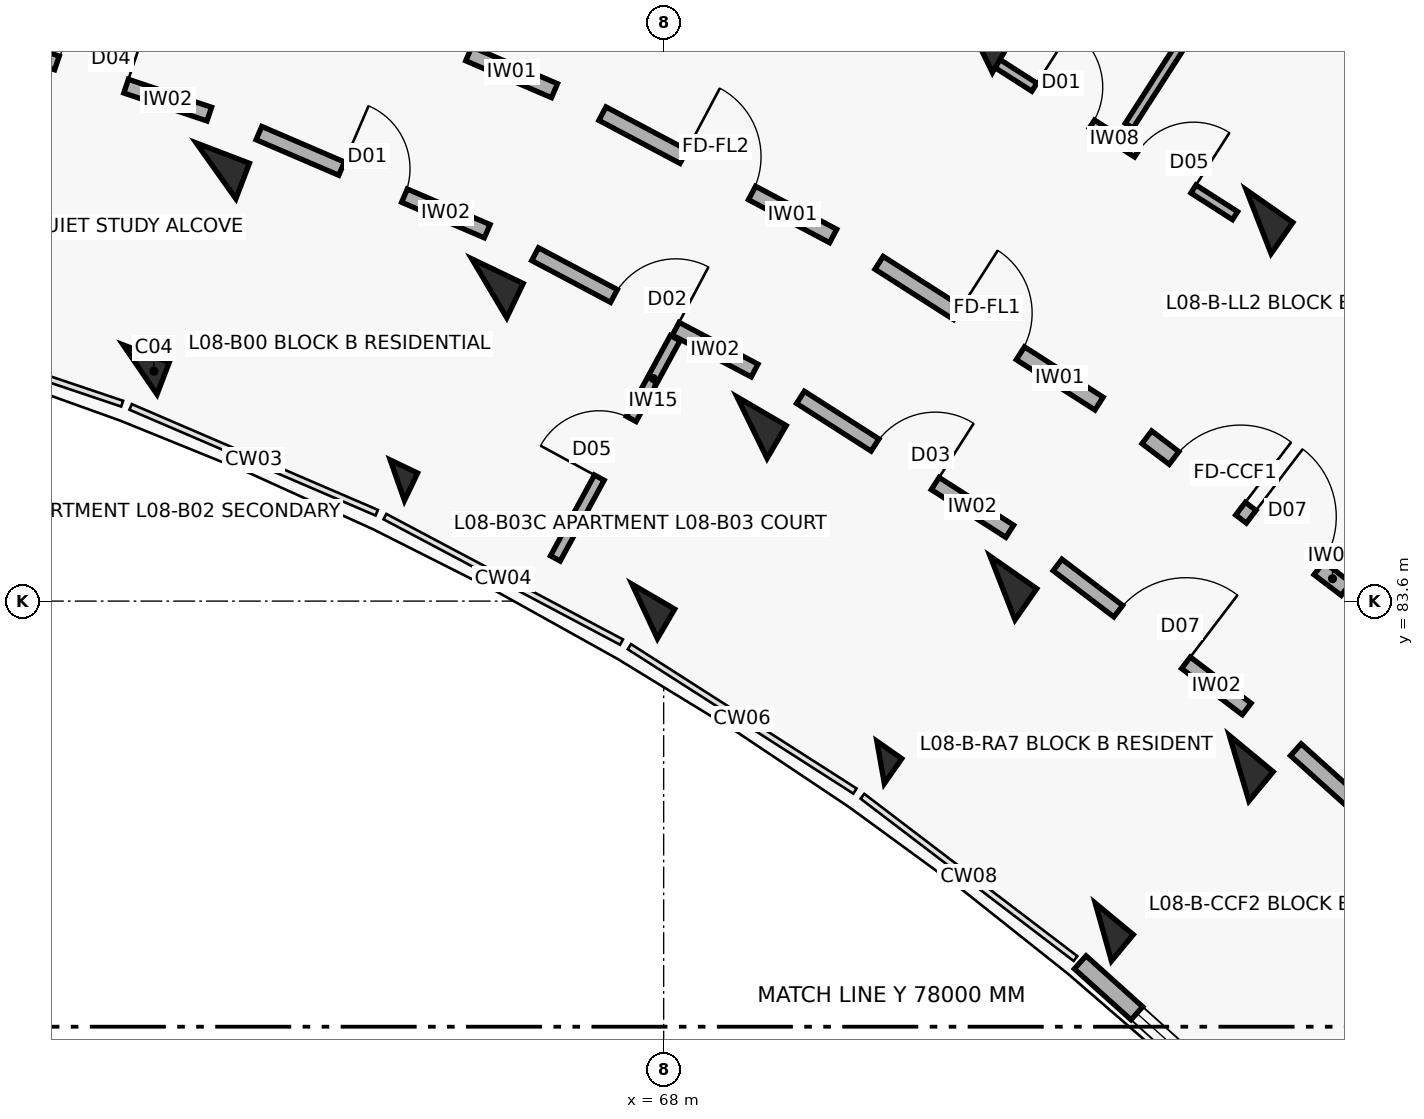
"""IFC4 building model, lengths in metres.
Left out: names, types, materials, properties, quantities, classifications, styles, units other than length and angle.
Written with IfcOpenShell. Run it as: python <this file> out.ifc"""

import sys

from ifc_helpers import new_model, si_unit, direction, frame, frame_2d, origin, origin_2d, place, context, subcontext, project, spatial, rectangle, extrude, element, fill, save


model = new_model("IFC4")
c1 = context("Model", 3, precision=1e-05, world=origin(), true_north=direction((0.0, 1.0)))
c2 = subcontext(c1, "Body", "Model", "MODEL_VIEW")
j1 = project(units=[si_unit("LENGTHUNIT", "METRE"), si_unit("PLANEANGLEUNIT", "RADIAN")], contexts=[c1])
p1 = place(None, origin())
s1 = spatial("IfcSite", under=j1, at=p1, CompositionType="ELEMENT")
p2 = place(p1, origin())
s2 = spatial("IfcBuilding", under=s1, at=p2, CompositionType="ELEMENT")
p3 = place(p2, frame((0.0, 0.0, 26.7)))
s3 = spatial("IfcBuildingStorey", under=s2, at=p3, CompositionType="ELEMENT", Elevation=26.7)
p4 = place(p3, frame((61.111, 86.646, 0.0), z_axis=(0.0, 0.0, 1.0), x_axis=(0.357064076459, 0.934079892355, 0.0)))
e1 = element("IfcColumn", 1, at=p4, inside=s3, PredefinedType="COLUMN", context=c2, shape_type="SweptSolid", body=[
    extrude(rectangle(XDim=0.45, YDim=0.65, at=origin_2d()), origin(), (0.0, 0.0, 1.0), 3.1),
])
p5 = place(p3, frame((62.111, 89.261, 0.0), z_axis=(0.0, 0.0, 1.0), x_axis=(0.357064076459, 0.934079892355, 0.0)))
e2 = element("IfcColumn", 2, at=p5, inside=s3, PredefinedType="COLUMN", context=c2, shape_type="SweptSolid", body=[
    extrude(rectangle(XDim=0.5, YDim=0.75, at=origin_2d()), origin(), (0.0, 0.0, 1.0), 3.1),
])
p6 = place(p3, frame((64.496, 85.191, 0.0), z_axis=(0.0, 0.0, 1.0), x_axis=(0.432085748802, 0.901832526405, 0.0)))
e3 = element("IfcColumn", 3, at=p6, inside=s3, PredefinedType="COLUMN", context=c2, shape_type="SweptSolid", body=[
    extrude(rectangle(XDim=0.4, YDim=0.4, at=origin_2d()), origin(), (0.0, 0.0, 1.0), 3.1),
])
p7 = place(p3, frame((65.706, 87.716, 0.0), z_axis=(0.0, 0.0, 1.0), x_axis=(0.432085748802, 0.901832526405, 0.0)))
e4 = element("IfcColumn", 4, at=p7, inside=s3, PredefinedType="COLUMN", context=c2, shape_type="SweptSolid", body=[
    extrude(rectangle(XDim=0.5, YDim=0.75, at=origin_2d()), origin(), (0.0, 0.0, 1.0), 3.1),
])
p8 = place(p3, frame((67.751, 83.464, 0.0), z_axis=(0.0, 0.0, 1.0), x_axis=(0.504226211181, 0.863571611366, 0.0)))
e5 = element("IfcColumn", 5, at=p8, inside=s3, PredefinedType="COLUMN", context=c2, shape_type="SweptSolid", body=[
    extrude(rectangle(XDim=0.45, YDim=0.65, at=origin_2d()), origin(), (0.0, 0.0, 1.0), 3.1),
])
for number, where, z_axis, x_axis in (
    (6, (69.163, 85.882, 0.0), (0.0, 0.0, 1.0), (0.504, 0.864, 0.0)),
    (7, (72.127, 90.96, 0.0), (0.0, 0.0, 1.0), (0.504, 0.864, 0.0)),
):
    element("IfcColumn", number, at=place(p3, frame(where, z_axis=z_axis, x_axis=x_axis)), inside=s3, PredefinedType="COLUMN", context=c2, shape_type="SweptSolid", body=[
        extrude(rectangle(XDim=0.5, YDim=0.75, at=origin_2d()), origin(), (0.0, 0.0, 1.0), 3.1),
    ])
p9 = place(p3, frame((70.854, 81.478, 0.0), z_axis=(0.0, 0.0, 1.0), x_axis=(0.573004420611, 0.819552276527, 0.0)))
e8 = element("IfcColumn", 8, at=p9, inside=s3, PredefinedType="COLUMN", context=c2, shape_type="SweptSolid", body=[
    extrude(rectangle(XDim=0.4, YDim=0.4, at=origin_2d()), origin(), (0.0, 0.0, 1.0), 3.1),
])
for number, where, z_axis, x_axis in (
    (9, (72.458, 83.773, 0.0), (0.0, 0.0, 1.0), (0.573, 0.82, 0.0)),
    (10, (75.828, 88.592, 0.0), (0.0, 0.0, 1.0), (0.573, 0.82, 0.0)),
):
    element("IfcColumn", number, at=place(p3, frame(where, z_axis=z_axis, x_axis=x_axis)), inside=s3, PredefinedType="COLUMN", context=c2, shape_type="SweptSolid", body=[
        extrude(rectangle(XDim=0.5, YDim=0.75, at=origin_2d()), origin(), (0.0, 0.0, 1.0), 3.1),
    ])
p10 = place(p3, frame((73.785, 79.245, 0.0), z_axis=(0.0, 0.0, 1.0), x_axis=(0.637961754089, 0.770068049148, 0.0)))
e11 = element("IfcColumn", 11, at=p10, inside=s3, PredefinedType="COLUMN", context=c2, shape_type="SweptSolid", body=[
    extrude(rectangle(XDim=0.45, YDim=0.65, at=origin_2d()), origin(), (0.0, 0.0, 1.0), 3.1),
])
p11 = place(p3, frame((75.571, 81.402, 0.0), z_axis=(0.0, 0.0, 1.0), x_axis=(0.637961754089, 0.770068049148, 0.0)))
e12 = element("IfcColumn", 12, at=p11, inside=s3, PredefinedType="COLUMN", context=c2, shape_type="SweptSolid", body=[
    extrude(rectangle(XDim=0.5, YDim=0.75, at=origin_2d()), origin(), (0.0, 0.0, 1.0), 3.1),
])
p12 = place(p3, frame((73.481, 78.847, 0.0), z_axis=(0.0, 0.0, 1.0), x_axis=(0.743385092197, -0.668863666751, 0.0)))
e13 = element("IfcWall", 13, at=p12, inside=s3, PredefinedType="SOLIDWALL", context=c2, shape_type="SweptSolid", body=[
    extrude(rectangle(XDim=3.604, YDim=0.23, at=frame_2d((1.802, 0.0))), origin(), (0.0, 0.0, 1.0), 2.25),
])
p13 = place(p12, frame((1.002, 0.0, 0.32)))
e14 = element("IfcOpeningElement", 14, at=p13, cuts=e13, PredefinedType="OPENING", context=c2, shape_type="SweptSolid", body=[
    extrude(rectangle(XDim=1.6, YDim=1.5, at=frame_2d((0.8, 0.75))), frame((0.0, 0.125, 0.0), z_axis=(0.0, -1.0, 0.0), x_axis=(1.0, 0.0, 0.0)), (0.0, 0.0, 1.0), 0.25),
])
p14 = place(p3, frame((58.923, 91.049, 0.0), z_axis=(0.0, 0.0, 1.0), x_axis=(0.94787351033, -0.318646839643, 0.0)))
e15 = element("IfcWall", 15, at=p14, inside=s3, PredefinedType="SOLIDWALL", context=c2, shape_type="SweptSolid", body=[
    extrude(rectangle(XDim=3.269, YDim=0.19, at=frame_2d((1.634, 0.0))), origin(), (0.0, 0.0, 1.0), 2.08),
])
p15 = place(p14, frame((1.154, 0.0, 0.0)))
e16 = element("IfcOpeningElement", 16, at=p15, cuts=e15, PredefinedType="OPENING", context=c2, shape_type="SweptSolid", body=[
    extrude(rectangle(XDim=0.96, YDim=2.1, at=frame_2d((0.48, 1.05))), frame((0.0, 0.105, 0.0), z_axis=(0.0, -1.0, 0.0), x_axis=(1.0, 0.0, 0.0)), (0.0, 0.0, 1.0), 0.21),
])
p16 = place(p3, frame((63.407, 91.673, 0.0), z_axis=(0.0, 0.0, 1.0), x_axis=(0.918718172399, -0.394913813008, 0.0)))
e17 = element("IfcWall", 17, at=p16, inside=s3, PredefinedType="SOLIDWALL", context=c2, shape_type="SweptSolid", body=[
    extrude(rectangle(XDim=3.436, YDim=0.2, at=frame_2d((1.718, 0.0))), origin(), (0.0, 0.0, 1.0), 2.08),
])
p17 = place(p16, frame((1.228, 0.0, 0.0)))
e18 = element("IfcOpeningElement", 18, at=p17, cuts=e17, PredefinedType="OPENING", context=c2, shape_type="SweptSolid", body=[
    extrude(rectangle(XDim=0.98, YDim=2.15, at=frame_2d((0.49, 1.075))), frame((0.0, 0.11, 0.0), z_axis=(0.0, -1.0, 0.0), x_axis=(1.0, 0.0, 0.0)), (0.0, 0.0, 1.0), 0.22),
])
p18 = place(p3, frame((62.675, 89.758, 0.0), z_axis=(0.0, 0.0, 1.0), x_axis=(0.918723391052, -0.394901672235, 0.0)))
e19 = element("IfcWall", 19, at=p18, inside=s3, PredefinedType="SOLIDWALL", context=c2, shape_type="SweptSolid", body=[
    extrude(rectangle(XDim=3.269, YDim=0.19, at=frame_2d((1.634, 0.0))), origin(), (0.0, 0.0, 1.0), 2.08),
])
p19 = place(p18, frame((1.184, 0.0, 0.0)))
e20 = element("IfcOpeningElement", 20, at=p19, cuts=e19, PredefinedType="OPENING", context=c2, shape_type="SweptSolid", body=[
    extrude(rectangle(XDim=0.9, YDim=2.1, at=frame_2d((0.45, 1.05))), frame((0.0, 0.105, 0.0), z_axis=(0.0, -1.0, 0.0), x_axis=(1.0, 0.0, 0.0)), (0.0, 0.0, 1.0), 0.21),
])
p20 = place(p3, frame((67.194, 90.014, 0.0), z_axis=(0.0, 0.0, 1.0), x_axis=(0.883410853063, -0.468599258099, 0.0)))
e21 = element("IfcWall", 21, at=p20, inside=s3, PredefinedType="SOLIDWALL", context=c2, shape_type="SweptSolid", body=[
    extrude(rectangle(XDim=3.436, YDim=0.2, at=frame_2d((1.718, 0.0))), origin(), (0.0, 0.0, 1.0), 2.08),
])
p21 = place(p20, frame((1.208, 0.0, 0.0)))
e22 = element("IfcOpeningElement", 22, at=p21, cuts=e21, PredefinedType="OPENING", context=c2, shape_type="SweptSolid", body=[
    extrude(rectangle(XDim=1.02, YDim=2.15, at=frame_2d((0.51, 1.075))), frame((0.0, 0.11, 0.0), z_axis=(0.0, -1.0, 0.0), x_axis=(1.0, 0.0, 0.0)), (0.0, 0.0, 1.0), 0.22),
])
p22 = place(p3, frame((66.309, 88.165, 0.0), z_axis=(0.0, 0.0, 1.0), x_axis=(0.883444301944, -0.468536194293, 0.0)))
e23 = element("IfcWall", 23, at=p22, inside=s3, PredefinedType="SOLIDWALL", context=c2, shape_type="SweptSolid", body=[
    extrude(rectangle(XDim=3.269, YDim=0.19, at=frame_2d((1.634, 0.0))), origin(), (0.0, 0.0, 1.0), 2.08),
])
p23 = place(p22, frame((1.174, 0.0, 0.0)))
e24 = element("IfcOpeningElement", 24, at=p23, cuts=e23, PredefinedType="OPENING", context=c2, shape_type="SweptSolid", body=[
    extrude(rectangle(XDim=0.92, YDim=2.1, at=frame_2d((0.46, 1.05))), frame((0.0, 0.105, 0.0), z_axis=(0.0, -1.0, 0.0), x_axis=(1.0, 0.0, 0.0)), (0.0, 0.0, 1.0), 0.21),
])
p24 = place(p3, frame((66.575, 84.162, 0.0), z_axis=(0.0, 0.0, 1.0), x_axis=(0.477841058477, 0.878446311868, 0.0)))
e25 = element("IfcWall", 25, at=p24, inside=s3, PredefinedType="PARTITIONING", context=c2, shape_type="SweptSolid", body=[
    extrude(rectangle(XDim=3.3, YDim=0.145, at=frame_2d((1.65, 0.0))), origin(), (0.0, 0.0, 1.0), 2.08),
])
p25 = place(p24, frame((1.21, 0.0, 0.0)))
e26 = element("IfcOpeningElement", 26, at=p25, cuts=e25, PredefinedType="OPENING", context=c2, shape_type="SweptSolid", body=[
    extrude(rectangle(XDim=0.88, YDim=2.1, at=frame_2d((0.44, 1.05))), frame((0.0, 0.083, 0.0), z_axis=(0.0, -1.0, 0.0), x_axis=(1.0, 0.0, 0.0)), (0.0, 0.0, 1.0), 0.165),
])
p26 = place(p3, frame((70.834, 88.051, 0.0), z_axis=(0.0, 0.0, 1.0), x_axis=(0.842257205985, -0.539075874963, 0.0)))
e27 = element("IfcWall", 27, at=p26, inside=s3, PredefinedType="SOLIDWALL", context=c2, shape_type="SweptSolid", body=[
    extrude(rectangle(XDim=3.436, YDim=0.2, at=frame_2d((1.718, 0.0))), origin(), (0.0, 0.0, 1.0), 2.08),
])
p27 = place(p26, frame((1.228, 0.0, 0.0)))
e28 = element("IfcOpeningElement", 28, at=p27, cuts=e27, PredefinedType="OPENING", context=c2, shape_type="SweptSolid", body=[
    extrude(rectangle(XDim=0.98, YDim=2.15, at=frame_2d((0.49, 1.075))), frame((0.0, 0.11, 0.0), z_axis=(0.0, -1.0, 0.0), x_axis=(1.0, 0.0, 0.0)), (0.0, 0.0, 1.0), 0.22),
])
p28 = place(p3, frame((69.8, 86.281, 0.0), z_axis=(0.0, 0.0, 1.0), x_axis=(0.842225276846, -0.539125758095, 0.0)))
e29 = element("IfcWall", 29, at=p28, inside=s3, PredefinedType="SOLIDWALL", context=c2, shape_type="SweptSolid", body=[
    extrude(rectangle(XDim=3.269, YDim=0.19, at=frame_2d((1.634, 0.0))), origin(), (0.0, 0.0, 1.0), 2.08),
])
p29 = place(p28, frame((1.164, 0.0, 0.0)))
e30 = element("IfcOpeningElement", 30, at=p29, cuts=e29, PredefinedType="OPENING", context=c2, shape_type="SweptSolid", body=[
    extrude(rectangle(XDim=0.94, YDim=2.1, at=frame_2d((0.47, 1.05))), frame((0.0, 0.105, 0.0), z_axis=(0.0, -1.0, 0.0), x_axis=(1.0, 0.0, 0.0)), (0.0, 0.0, 1.0), 0.21),
])
p30 = place(p3, frame((72.33, 90.712, 0.0), z_axis=(0.0, 0.0, 1.0), x_axis=(0.842245628842, -0.539093962771, 0.0)))
e31 = element("IfcWall", 31, at=p30, inside=s3, PredefinedType="PARTITIONING", context=c2, shape_type="SweptSolid", body=[
    extrude(rectangle(XDim=3.785, YDim=0.125, at=frame_2d((1.893, 0.0))), origin(), (0.0, 0.0, 1.0), 2.08),
])
p31 = place(p30, frame((0.65, 0.0, 0.0)))
e32 = element("IfcOpeningElement", 32, at=p31, cuts=e31, PredefinedType="OPENING", context=c2, shape_type="SweptSolid", body=[
    extrude(rectangle(XDim=0.9, YDim=2.1, at=frame_2d((0.45, 1.05))), frame((0.0, 0.073, 0.0), z_axis=(0.0, -1.0, 0.0), x_axis=(1.0, 0.0, 0.0)), (0.0, 0.0, 1.0), 0.145),
])
p32 = place(p30, frame((2.255, 0.0, 0.0)))
e33 = element("IfcOpeningElement", 33, at=p32, cuts=e31, PredefinedType="OPENING", context=c2, shape_type="SweptSolid", body=[
    extrude(rectangle(XDim=0.88, YDim=2.1, at=frame_2d((0.44, 1.05))), frame((0.0, 0.073, 0.0), z_axis=(0.0, -1.0, 0.0), x_axis=(1.0, 0.0, 0.0)), (0.0, 0.0, 1.0), 0.145),
])
p33 = place(p3, frame((74.124, 89.854, 0.0), z_axis=(0.0, 0.0, 1.0), x_axis=(0.5403494769, 0.84144069477, 0.0)))
e34 = element("IfcWall", 34, at=p33, inside=s3, PredefinedType="PARTITIONING", context=c2, shape_type="SweptSolid", body=[
    extrude(rectangle(XDim=5.05, YDim=0.12, at=frame_2d((2.525, 0.0))), origin(), (0.0, 0.0, 1.0), 2.08),
])
p34 = place(p33, frame((1.875, 0.0, 0.0)))
e35 = element("IfcOpeningElement", 35, at=p34, cuts=e34, PredefinedType="OPENING", context=c2, shape_type="SweptSolid", body=[
    extrude(rectangle(XDim=1.3, YDim=2.1, at=frame_2d((0.65, 1.05))), frame((0.0, 0.07, 0.0), z_axis=(0.0, -1.0, 0.0), x_axis=(1.0, 0.0, 0.0)), (0.0, 0.0, 1.0), 0.14),
])
p35 = place(p3, frame((74.357, 85.756, 0.0), z_axis=(0.0, 0.0, 1.0), x_axis=(0.795498026433, -0.605956178235, 0.0)))
e36 = element("IfcWall", 36, at=p35, inside=s3, PredefinedType="SOLIDWALL", context=c2, shape_type="SweptSolid", body=[
    extrude(rectangle(XDim=3.296, YDim=0.21, at=frame_2d((1.648, 0.0))), origin(), (0.0, 0.0, 1.0), 2.08),
])
p36 = place(p35, frame((0.45, 0.0, 0.0)))
e37 = element("IfcOpeningElement", 37, at=p36, cuts=e36, PredefinedType="OPENING", context=c2, shape_type="SweptSolid", body=[
    extrude(rectangle(XDim=1.1, YDim=2.15, at=frame_2d((0.55, 1.075))), frame((0.0, 0.115, 0.0), z_axis=(0.0, -1.0, 0.0), x_axis=(1.0, 0.0, 0.0)), (0.0, 0.0, 1.0), 0.23),
])
p37 = place(p35, frame((1.726, 0.0, 0.0)))
e38 = element("IfcOpeningElement", 38, at=p37, cuts=e36, PredefinedType="OPENING", context=c2, shape_type="SweptSolid", body=[
    extrude(rectangle(XDim=1.12, YDim=2.15, at=frame_2d((0.56, 1.075))), frame((0.0, 0.115, 0.0), z_axis=(0.0, -1.0, 0.0), x_axis=(1.0, 0.0, 0.0)), (0.0, 0.0, 1.0), 0.23),
])
p38 = place(p3, frame((73.182, 84.076, 0.0), z_axis=(0.0, 0.0, 1.0), x_axis=(0.795501577908, -0.605951515838, 0.0)))
e39 = element("IfcWall", 39, at=p38, inside=s3, PredefinedType="SOLIDWALL", context=c2, shape_type="SweptSolid", body=[
    extrude(rectangle(XDim=3.129, YDim=0.19, at=frame_2d((1.564, 0.0))), origin(), (0.0, 0.0, 1.0), 2.08),
])
p39 = place(p38, frame((1.004, 0.0, 0.0)))
e40 = element("IfcOpeningElement", 40, at=p39, cuts=e39, PredefinedType="OPENING", context=c2, shape_type="SweptSolid", body=[
    extrude(rectangle(XDim=1.12, YDim=2.15, at=frame_2d((0.56, 1.075))), frame((0.0, 0.105, 0.0), z_axis=(0.0, -1.0, 0.0), x_axis=(1.0, 0.0, 0.0)), (0.0, 0.0, 1.0), 0.21),
])
p40 = place(p3, frame((76.317, 81.644, 0.0), z_axis=(0.0, 0.0, 1.0), x_axis=(0.743387266925, -0.668861249718, 0.0)))
e41 = element("IfcWall", 41, at=p40, inside=s3, PredefinedType="SOLIDWALL", context=c2, shape_type="SweptSolid", body=[
    extrude(rectangle(XDim=3.128, YDim=0.21, at=frame_2d((1.564, 0.0))), origin(), (0.0, 0.0, 1.0), 2.08),
])
p41 = place(p40, frame((1.014, 0.0, 0.0)))
e42 = element("IfcOpeningElement", 42, at=p41, cuts=e41, PredefinedType="OPENING", context=c2, shape_type="SweptSolid", body=[
    extrude(rectangle(XDim=1.1, YDim=2.15, at=frame_2d((0.55, 1.075))), frame((0.0, 0.115, 0.0), z_axis=(0.0, -1.0, 0.0), x_axis=(1.0, 0.0, 0.0)), (0.0, 0.0, 1.0), 0.23),
])
p42 = place(p13, origin())
e43 = element("IfcWindow", 43, at=p42, inside=s3, PartitioningType="DOUBLE_PANEL_VERTICAL", PredefinedType="WINDOW", context=c2, shape_type="SweptSolid", body=[
    extrude(rectangle(XDim=1.6, YDim=1.5, at=frame_2d((0.8, 0.75))), frame((0.0, 0.03, 0.0), z_axis=(0.0, -1.0, 0.0), x_axis=(1.0, 0.0, 0.0)), (0.0, 0.0, 1.0), 0.06),
])
fill(e14, e43)
p43 = place(p15, origin())
e44 = element("IfcDoor", 44, at=p43, inside=s3, OperationType="SINGLE_SWING_RIGHT", PredefinedType="DOOR", context=c2, shape_type="SweptSolid", body=[
    extrude(rectangle(XDim=0.96, YDim=2.1, at=frame_2d((0.48, 1.05))), frame((0.0, 0.025, 0.0), z_axis=(0.0, -1.0, 0.0), x_axis=(1.0, 0.0, 0.0)), (0.0, 0.0, 1.0), 0.05),
])
fill(e16, e44)
p44 = place(p17, origin())
e45 = element("IfcDoor", 45, at=p44, inside=s3, OperationType="SINGLE_SWING_RIGHT", PredefinedType="DOOR", context=c2, shape_type="SweptSolid", body=[
    extrude(rectangle(XDim=0.98, YDim=2.15, at=frame_2d((0.49, 1.075))), frame((0.0, 0.025, 0.0), z_axis=(0.0, -1.0, 0.0), x_axis=(1.0, 0.0, 0.0)), (0.0, 0.0, 1.0), 0.05),
])
fill(e18, e45)
p45 = place(p19, origin())
e46 = element("IfcDoor", 46, at=p45, inside=s3, OperationType="SINGLE_SWING_LEFT", PredefinedType="DOOR", context=c2, shape_type="SweptSolid", body=[
    extrude(rectangle(XDim=0.9, YDim=2.1, at=frame_2d((0.45, 1.05))), frame((0.0, 0.025, 0.0), z_axis=(0.0, -1.0, 0.0), x_axis=(1.0, 0.0, 0.0)), (0.0, 0.0, 1.0), 0.05),
])
fill(e20, e46)
p46 = place(p21, origin())
e47 = element("IfcDoor", 47, at=p46, inside=s3, OperationType="SINGLE_SWING_LEFT", PredefinedType="DOOR", context=c2, shape_type="SweptSolid", body=[
    extrude(rectangle(XDim=1.02, YDim=2.15, at=frame_2d((0.51, 1.075))), frame((0.0, 0.025, 0.0), z_axis=(0.0, -1.0, 0.0), x_axis=(1.0, 0.0, 0.0)), (0.0, 0.0, 1.0), 0.05),
])
fill(e22, e47)
p47 = place(p23, origin())
e48 = element("IfcDoor", 48, at=p47, inside=s3, OperationType="SINGLE_SWING_RIGHT", PredefinedType="DOOR", context=c2, shape_type="SweptSolid", body=[
    extrude(rectangle(XDim=0.92, YDim=2.1, at=frame_2d((0.46, 1.05))), frame((0.0, 0.025, 0.0), z_axis=(0.0, -1.0, 0.0), x_axis=(1.0, 0.0, 0.0)), (0.0, 0.0, 1.0), 0.05),
])
fill(e24, e48)
p48 = place(p25, origin())
e49 = element("IfcDoor", 49, at=p48, inside=s3, OperationType="SINGLE_SWING_LEFT", PredefinedType="DOOR", context=c2, shape_type="SweptSolid", body=[
    extrude(rectangle(XDim=0.88, YDim=2.1, at=frame_2d((0.44, 1.05))), frame((0.0, 0.025, 0.0), z_axis=(0.0, -1.0, 0.0), x_axis=(1.0, 0.0, 0.0)), (0.0, 0.0, 1.0), 0.05),
])
fill(e26, e49)
p49 = place(p27, origin())
e50 = element("IfcDoor", 50, at=p49, inside=s3, OperationType="SINGLE_SWING_LEFT", PredefinedType="DOOR", context=c2, shape_type="SweptSolid", body=[
    extrude(rectangle(XDim=0.98, YDim=2.15, at=frame_2d((0.49, 1.075))), frame((0.0, 0.025, 0.0), z_axis=(0.0, -1.0, 0.0), x_axis=(1.0, 0.0, 0.0)), (0.0, 0.0, 1.0), 0.05),
])
fill(e28, e50)
p50 = place(p29, origin())
e51 = element("IfcDoor", 51, at=p50, inside=s3, OperationType="SINGLE_SWING_RIGHT", PredefinedType="DOOR", context=c2, shape_type="SweptSolid", body=[
    extrude(rectangle(XDim=0.94, YDim=2.1, at=frame_2d((0.47, 1.05))), frame((0.0, 0.025, 0.0), z_axis=(0.0, -1.0, 0.0), x_axis=(1.0, 0.0, 0.0)), (0.0, 0.0, 1.0), 0.05),
])
fill(e30, e51)
p51 = place(p31, origin())
e52 = element("IfcDoor", 52, at=p51, inside=s3, OperationType="SINGLE_SWING_LEFT", PredefinedType="DOOR", context=c2, shape_type="SweptSolid", body=[
    extrude(rectangle(XDim=0.9, YDim=2.1, at=frame_2d((0.45, 1.05))), frame((0.0, 0.025, 0.0), z_axis=(0.0, -1.0, 0.0), x_axis=(1.0, 0.0, 0.0)), (0.0, 0.0, 1.0), 0.05),
])
fill(e32, e52)
p52 = place(p32, origin())
e53 = element("IfcDoor", 53, at=p52, inside=s3, OperationType="SINGLE_SWING_RIGHT", PredefinedType="DOOR", context=c2, shape_type="SweptSolid", body=[
    extrude(rectangle(XDim=0.88, YDim=2.1, at=frame_2d((0.44, 1.05))), frame((0.0, 0.025, 0.0), z_axis=(0.0, -1.0, 0.0), x_axis=(1.0, 0.0, 0.0)), (0.0, 0.0, 1.0), 0.05),
])
fill(e33, e53)
p53 = place(p36, origin())
e54 = element("IfcDoor", 54, at=p53, inside=s3, OperationType="SINGLE_SWING_RIGHT", PredefinedType="DOOR", context=c2, shape_type="SweptSolid", body=[
    extrude(rectangle(XDim=1.1, YDim=2.15, at=frame_2d((0.55, 1.075))), frame((0.0, 0.025, 0.0), z_axis=(0.0, -1.0, 0.0), x_axis=(1.0, 0.0, 0.0)), (0.0, 0.0, 1.0), 0.05),
])
fill(e37, e54)
p54 = place(p37, origin())
e55 = element("IfcDoor", 55, at=p54, inside=s3, OperationType="SINGLE_SWING_LEFT", PredefinedType="DOOR", context=c2, shape_type="SweptSolid", body=[
    extrude(rectangle(XDim=1.12, YDim=2.15, at=frame_2d((0.56, 1.075))), frame((0.0, 0.025, 0.0), z_axis=(0.0, -1.0, 0.0), x_axis=(1.0, 0.0, 0.0)), (0.0, 0.0, 1.0), 0.05),
])
fill(e38, e55)
p55 = place(p39, origin())
e56 = element("IfcDoor", 56, at=p55, inside=s3, OperationType="SINGLE_SWING_RIGHT", PredefinedType="DOOR", context=c2, shape_type="SweptSolid", body=[
    extrude(rectangle(XDim=1.12, YDim=2.15, at=frame_2d((0.56, 1.075))), frame((0.0, 0.025, 0.0), z_axis=(0.0, -1.0, 0.0), x_axis=(1.0, 0.0, 0.0)), (0.0, 0.0, 1.0), 0.05),
])
fill(e40, e56)
save(model, sys.argv[1])
